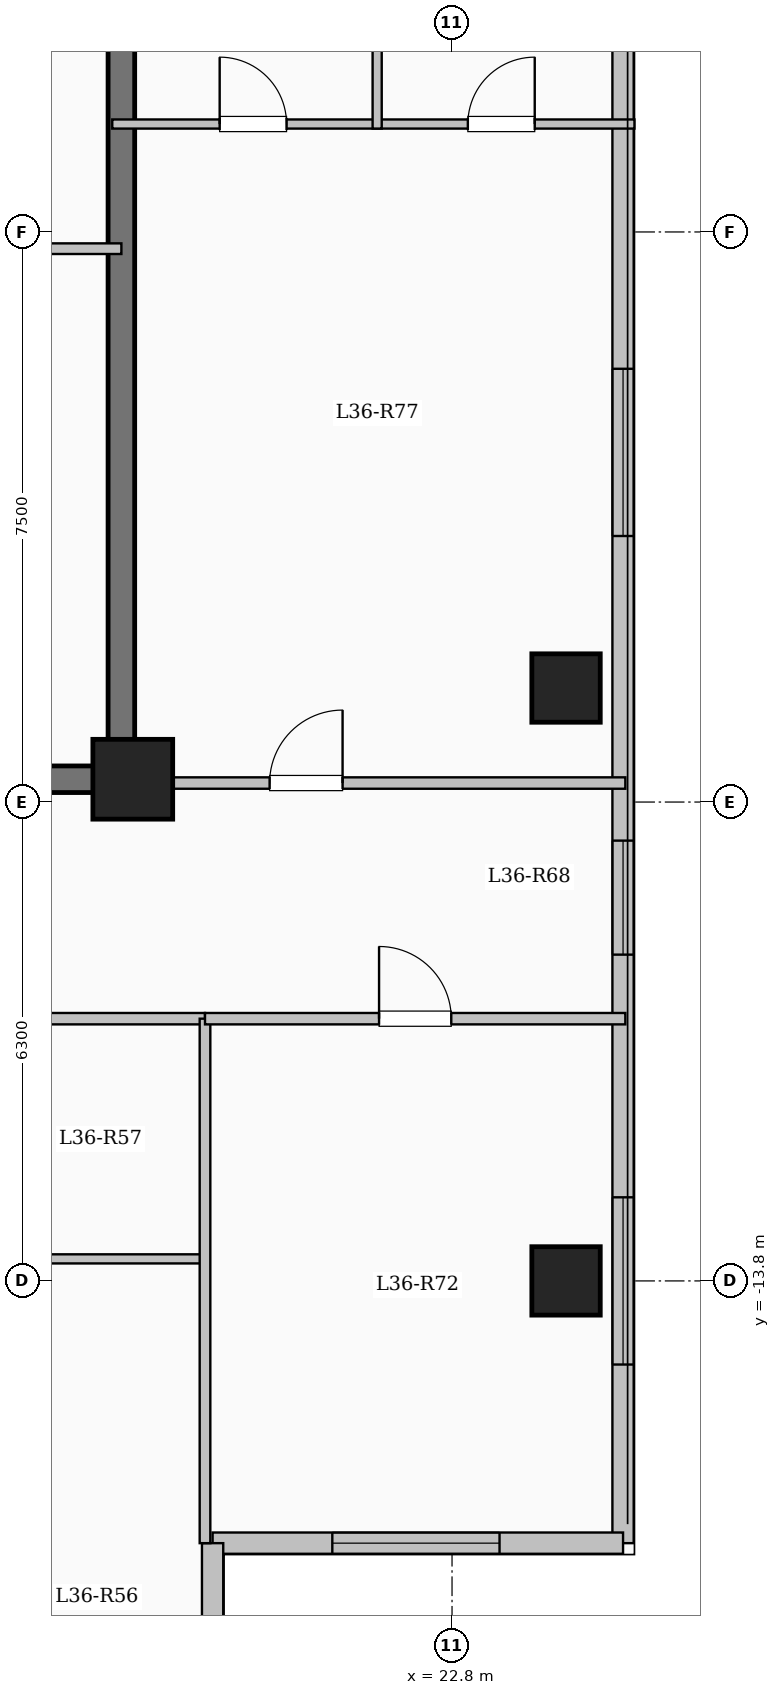
"""IFC4 building model, lengths in metres.
Left out: names, types, materials, properties, quantities, classifications, styles, units other than length and angle.
Written with IfcOpenShell. Run it as: python <this file> out.ifc"""

import sys

from ifc_helpers import new_model, si_unit, direction, frame, frame_2d, origin, origin_2d, place, context, subcontext, project, spatial, rectangle, extrude, element, fill, save


model = new_model("IFC4")
c1 = context("Model", 3, precision=1e-05, world=origin(), true_north=direction((0.0, 1.0)))
c2 = subcontext(c1, "Body", "Model", "MODEL_VIEW")
j1 = project(units=[si_unit("LENGTHUNIT", "METRE"), si_unit("PLANEANGLEUNIT", "RADIAN")], contexts=[c1])
p1 = place(None, origin())
s1 = spatial("IfcSite", under=j1, at=p1, CompositionType="ELEMENT")
p2 = place(p1, origin())
s2 = spatial("IfcBuilding", under=s1, at=p2, CompositionType="ELEMENT")
p3 = place(p2, frame((0.0, 0.0, 135.95)))
s3 = spatial("IfcBuildingStorey", under=s2, at=p3, CompositionType="ELEMENT", Elevation=135.95)
p4 = place(p3, frame((18.6, -7.2, 0.0), z_axis=(0.0, 0.0, 1.0), x_axis=(1.0, 0.0, 0.0)))
e1 = element("IfcColumn", 1, at=p4, inside=s3, PredefinedType="COLUMN", context=c2, shape_type="SweptSolid", body=[
    extrude(rectangle(XDim=1.05, YDim=1.05, at=origin_2d()), origin(), (0.0, 0.0, 1.0), 3.35),
])
for number, where, z_axis, x_axis in (
    (2, (24.3, -13.8, 0.0), (0.0, 0.0, 1.0), (1.0, 0.0, 0.0)),
    (3, (24.3, -6.0, 0.0), (0.0, 0.0, 1.0), (1.0, 0.0, 0.0)),
):
    element("IfcColumn", number, at=place(p3, frame(where, z_axis=z_axis, x_axis=x_axis)), inside=s3, PredefinedType="COLUMN", context=c2, shape_type="SweptSolid", body=[
        extrude(rectangle(XDim=0.9, YDim=0.9, at=origin_2d()), origin(), (0.0, 0.0, 1.0), 3.35),
    ])
p5 = place(p3, frame((25.05, 17.25, 0.0), z_axis=(0.0, 0.0, 1.0), x_axis=(0.0, -1.0, 0.0)))
e4 = element("IfcWall", 4, at=p5, inside=s3, PredefinedType="SOLIDWALL", context=c2, shape_type="SweptSolid", body=[
    extrude(rectangle(XDim=34.5, YDim=0.28, at=frame_2d((17.25, 0.0))), origin(), (0.0, 0.0, 1.0), 3.1),
])
p6 = place(p5, frame((1.375, 0.0, 0.9)))
e5 = element("IfcOpeningElement", 5, at=p6, cuts=e4, PredefinedType="OPENING", context=c2, shape_type="SweptSolid", body=[
    extrude(rectangle(XDim=2.0, YDim=1.7, at=frame_2d((1.0, 0.85))), frame((0.0, 0.15, 0.0), z_axis=(0.0, -1.0, 0.0), x_axis=(1.0, 0.0, 0.0)), (0.0, 0.0, 1.0), 0.3),
])
p7 = place(p5, frame((5.125, 0.0, 0.95)))
e6 = element("IfcOpeningElement", 6, at=p7, cuts=e4, PredefinedType="OPENING", context=c2, shape_type="SweptSolid", body=[
    extrude(rectangle(XDim=1.0, YDim=1.5, at=frame_2d((0.5, 0.75))), frame((0.0, 0.15, 0.0), z_axis=(0.0, -1.0, 0.0), x_axis=(1.0, 0.0, 0.0)), (0.0, 0.0, 1.0), 0.3),
])
p8 = place(p5, frame((8.375, 0.0, 0.9)))
e7 = element("IfcOpeningElement", 7, at=p8, cuts=e4, PredefinedType="OPENING", context=c2, shape_type="SweptSolid", body=[
    extrude(rectangle(XDim=2.0, YDim=1.7, at=frame_2d((1.0, 0.85))), frame((0.0, 0.15, 0.0), z_axis=(0.0, -1.0, 0.0), x_axis=(1.0, 0.0, 0.0)), (0.0, 0.0, 1.0), 0.3),
])
p9 = place(p5, frame((13.2, 0.0, 0.9)))
e8 = element("IfcOpeningElement", 8, at=p9, cuts=e4, PredefinedType="OPENING", context=c2, shape_type="SweptSolid", body=[
    extrude(rectangle(XDim=1.65, YDim=1.6, at=frame_2d((0.825, 0.8))), frame((0.0, 0.15, 0.0), z_axis=(0.0, -1.0, 0.0), x_axis=(1.0, 0.0, 0.0)), (0.0, 0.0, 1.0), 0.3),
])
p10 = place(p5, frame((19.05, 0.0, 0.9)))
e9 = element("IfcOpeningElement", 9, at=p10, cuts=e4, PredefinedType="OPENING", context=c2, shape_type="SweptSolid", body=[
    extrude(rectangle(XDim=2.2, YDim=1.75, at=frame_2d((1.1, 0.875))), frame((0.0, 0.15, 0.0), z_axis=(0.0, -1.0, 0.0), x_axis=(1.0, 0.0, 0.0)), (0.0, 0.0, 1.0), 0.3),
])
p11 = place(p5, frame((25.258, 0.0, 0.9)))
e10 = element("IfcOpeningElement", 10, at=p11, cuts=e4, PredefinedType="OPENING", context=c2, shape_type="SweptSolid", body=[
    extrude(rectangle(XDim=1.5, YDim=1.65, at=frame_2d((0.75, 0.825))), frame((0.0, 0.15, 0.0), z_axis=(0.0, -1.0, 0.0), x_axis=(1.0, 0.0, 0.0)), (0.0, 0.0, 1.0), 0.3),
])
p12 = place(p5, frame((29.95, 0.0, 0.9)))
e11 = element("IfcOpeningElement", 11, at=p12, cuts=e4, PredefinedType="OPENING", context=c2, shape_type="SweptSolid", body=[
    extrude(rectangle(XDim=2.2, YDim=1.75, at=frame_2d((1.1, 0.875))), frame((0.0, 0.15, 0.0), z_axis=(0.0, -1.0, 0.0), x_axis=(1.0, 0.0, 0.0)), (0.0, 0.0, 1.0), 0.3),
])
p13 = place(p3, frame((25.05, -17.25, 0.0), z_axis=(0.0, 0.0, 1.0), x_axis=(-1.0, 0.0, 0.0)))
e12 = element("IfcWall", 12, at=p13, inside=s3, PredefinedType="SOLIDWALL", context=c2, shape_type="SweptSolid", body=[
    extrude(rectangle(XDim=5.4, YDim=0.28, at=frame_2d((2.7, 0.0))), origin(), (0.0, 0.0, 1.0), 3.1),
])
p14 = place(p13, frame((1.625, 0.0, 0.9)))
e13 = element("IfcOpeningElement", 13, at=p14, cuts=e12, PredefinedType="OPENING", context=c2, shape_type="SweptSolid", body=[
    extrude(rectangle(XDim=2.2, YDim=1.75, at=frame_2d((1.1, 0.875))), frame((0.0, 0.15, 0.0), z_axis=(0.0, -1.0, 0.0), x_axis=(1.0, 0.0, 0.0)), (0.0, 0.0, 1.0), 0.3),
])
p15 = place(p3, frame((19.65, -17.25, 0.0), z_axis=(0.0, 0.0, 1.0), x_axis=(0.0, -1.0, 0.0)))
e14 = element("IfcWall", 14, at=p15, inside=s3, PredefinedType="SOLIDWALL", context=c2, shape_type="SweptSolid", body=[
    extrude(rectangle(XDim=3.9, YDim=0.28, at=frame_2d((1.95, 0.0))), origin(), (0.0, 0.0, 1.0), 3.1),
])
p16 = place(p15, frame((1.107, 0.0, 0.9)))
e15 = element("IfcOpeningElement", 15, at=p16, cuts=e14, PredefinedType="OPENING", context=c2, shape_type="SweptSolid", body=[
    extrude(rectangle(XDim=1.65, YDim=1.6, at=frame_2d((0.825, 0.8))), frame((0.0, 0.15, 0.0), z_axis=(0.0, -1.0, 0.0), x_axis=(1.0, 0.0, 0.0)), (0.0, 0.0, 1.0), 0.3),
])
p17 = place(p3, frame((18.45, -7.375, 0.0), z_axis=(0.0, 0.0, 1.0), x_axis=(0.0, 1.0, 0.0)))
e16 = element("IfcWall", 16, at=p17, inside=s3, PredefinedType="SHEAR", context=c2, shape_type="SweptSolid", body=[
    extrude(rectangle(XDim=14.05, YDim=0.35, at=frame_2d((7.025, 0.0))), origin(), (0.0, 0.0, 1.0), 3.35),
])
p18 = place(p3, frame((10.075, -7.2, 0.0), z_axis=(0.0, 0.0, 1.0), x_axis=(1.0, 0.0, 0.0)))
e17 = element("IfcWall", 17, at=p18, inside=s3, PredefinedType="SHEAR", context=c2, shape_type="SweptSolid", body=[
    extrude(rectangle(XDim=8.55, YDim=0.35, at=frame_2d((4.275, 0.0))), origin(), (0.0, 0.0, 1.0), 3.35),
])
p19 = place(p3, frame((15.4, -0.22, 0.0), z_axis=(0.0, 0.0, 1.0), x_axis=(1.0, 0.0, 0.0)))
e18 = element("IfcWall", 18, at=p19, inside=s3, PredefinedType="PARTITIONING", context=c2, shape_type="SweptSolid", body=[
    extrude(rectangle(XDim=3.05, YDim=0.14, at=frame_2d((1.525, 0.0))), origin(), (0.0, 0.0, 1.0), 3.1),
])
p20 = place(p19, frame((1.05, 0.0, 0.0)))
e19 = element("IfcOpeningElement", 19, at=p20, cuts=e18, PredefinedType="OPENING", context=c2, shape_type="SweptSolid", body=[
    extrude(rectangle(XDim=0.9, YDim=2.08, at=frame_2d((0.45, 1.04))), frame((0.0, 0.08, 0.0), z_axis=(0.0, -1.0, 0.0), x_axis=(1.0, 0.0, 0.0)), (0.0, 0.0, 1.0), 0.16),
])
p21 = place(p3, frame((8.55, -10.35, 0.0), z_axis=(0.0, 0.0, 1.0), x_axis=(1.0, 0.0, 0.0)))
e20 = element("IfcWall", 20, at=p21, inside=s3, PredefinedType="PARTITIONING", context=c2, shape_type="SweptSolid", body=[
    extrude(rectangle(XDim=11.0, YDim=0.15, at=frame_2d((5.5, 0.0))), origin(), (0.0, 0.0, 1.0), 3.1),
])
p22 = place(p21, frame((0.75, 0.0, 0.0)))
e21 = element("IfcOpeningElement", 21, at=p22, cuts=e20, PredefinedType="OPENING", context=c2, shape_type="SweptSolid", body=[
    extrude(rectangle(XDim=0.96, YDim=2.15, at=frame_2d((0.48, 1.075))), frame((0.0, 0.085, 0.0), z_axis=(0.0, -1.0, 0.0), x_axis=(1.0, 0.0, 0.0)), (0.0, 0.0, 1.0), 0.17),
])
p23 = place(p21, frame((5.787, 0.0, 0.0)))
e22 = element("IfcOpeningElement", 22, at=p23, cuts=e20, PredefinedType="OPENING", context=c2, shape_type="SweptSolid", body=[
    extrude(rectangle(XDim=0.96, YDim=2.15, at=frame_2d((0.48, 1.075))), frame((0.0, 0.085, 0.0), z_axis=(0.0, -1.0, 0.0), x_axis=(1.0, 0.0, 0.0)), (0.0, 0.0, 1.0), 0.17),
])
p24 = place(p3, frame((16.649, -13.51, 0.0), z_axis=(0.0, 0.0, 1.0), x_axis=(1.0, 0.0, 0.0)))
e23 = element("IfcWall", 23, at=p24, inside=s3, PredefinedType="PARTITIONING", context=c2, shape_type="SweptSolid", body=[
    extrude(rectangle(XDim=2.961, YDim=0.12, at=frame_2d((1.48, 0.0))), origin(), (0.0, 0.0, 1.0), 3.1),
])
p25 = place(p3, frame((18.45, -7.25, 0.0), z_axis=(0.0, 0.0, 1.0), x_axis=(1.0, 0.0, 0.0)))
e24 = element("IfcWall", 24, at=p25, inside=s3, PredefinedType="PARTITIONING", context=c2, shape_type="SweptSolid", body=[
    extrude(rectangle(XDim=6.63, YDim=0.15, at=frame_2d((3.315, 0.0))), origin(), (0.0, 0.0, 1.0), 3.1),
])
p26 = place(p25, frame((1.95, 0.0, 0.0)))
e25 = element("IfcOpeningElement", 25, at=p26, cuts=e24, PredefinedType="OPENING", context=c2, shape_type="SweptSolid", body=[
    extrude(rectangle(XDim=0.96, YDim=2.15, at=frame_2d((0.48, 1.075))), frame((0.0, 0.085, 0.0), z_axis=(0.0, -1.0, 0.0), x_axis=(1.0, 0.0, 0.0)), (0.0, 0.0, 1.0), 0.17),
])
p27 = place(p3, frame((19.55, -17.25, 0.0), z_axis=(0.0, 0.0, 1.0), x_axis=(0.0, 1.0, 0.0)))
e26 = element("IfcWall", 26, at=p27, inside=s3, PredefinedType="PARTITIONING", context=c2, shape_type="SweptSolid", body=[
    extrude(rectangle(XDim=6.9, YDim=0.14, at=frame_2d((3.45, 0.0))), origin(), (0.0, 0.0, 1.0), 3.1),
])
p28 = place(p3, frame((19.55, -10.35, 0.0), z_axis=(0.0, 0.0, 1.0), x_axis=(1.0, 0.0, 0.0)))
e27 = element("IfcWall", 27, at=p28, inside=s3, PredefinedType="PARTITIONING", context=c2, shape_type="SweptSolid", body=[
    extrude(rectangle(XDim=5.53, YDim=0.15, at=frame_2d((2.765, 0.0))), origin(), (0.0, 0.0, 1.0), 3.1),
])
p29 = place(p28, frame((2.29, 0.0, 0.0)))
e28 = element("IfcOpeningElement", 28, at=p29, cuts=e27, PredefinedType="OPENING", context=c2, shape_type="SweptSolid", body=[
    extrude(rectangle(XDim=0.95, YDim=2.15, at=frame_2d((0.475, 1.075))), frame((0.0, 0.085, 0.0), z_axis=(0.0, -1.0, 0.0), x_axis=(1.0, 0.0, 0.0)), (0.0, 0.0, 1.0), 0.17),
])
p30 = place(p3, frame((18.33, 1.42, 0.0), z_axis=(0.0, 0.0, 1.0), x_axis=(1.0, 0.0, 0.0)))
e29 = element("IfcWall", 29, at=p30, inside=s3, PredefinedType="PARTITIONING", context=c2, shape_type="SweptSolid", body=[
    extrude(rectangle(XDim=6.87, YDim=0.12, at=frame_2d((3.435, 0.0))), origin(), (0.0, 0.0, 1.0), 3.1),
])
p31 = place(p30, frame((1.413, 0.0, 0.0)))
e30 = element("IfcOpeningElement", 30, at=p31, cuts=e29, PredefinedType="OPENING", context=c2, shape_type="SweptSolid", body=[
    extrude(rectangle(XDim=0.88, YDim=2.1, at=frame_2d((0.44, 1.05))), frame((0.0, 0.07, 0.0), z_axis=(0.0, -1.0, 0.0), x_axis=(1.0, 0.0, 0.0)), (0.0, 0.0, 1.0), 0.14),
])
p32 = place(p30, frame((4.678, 0.0, 0.0)))
e31 = element("IfcOpeningElement", 31, at=p32, cuts=e29, PredefinedType="OPENING", context=c2, shape_type="SweptSolid", body=[
    extrude(rectangle(XDim=0.88, YDim=2.1, at=frame_2d((0.44, 1.05))), frame((0.0, 0.07, 0.0), z_axis=(0.0, -1.0, 0.0), x_axis=(1.0, 0.0, 0.0)), (0.0, 0.0, 1.0), 0.14),
])
p33 = place(p3, frame((21.815, 1.36, 0.0), z_axis=(0.0, 0.0, 1.0), x_axis=(0.0, 1.0, 0.0)))
e32 = element("IfcWall", 32, at=p33, inside=s3, PredefinedType="PARTITIONING", context=c2, shape_type="SweptSolid", body=[
    extrude(rectangle(XDim=3.58, YDim=0.12, at=frame_2d((1.79, 0.0))), origin(), (0.0, 0.0, 1.0), 3.1),
])
p34 = place(p10, origin())
e33 = element("IfcWindow", 33, at=p34, inside=s3, PartitioningType="SINGLE_PANEL", PredefinedType="WINDOW", context=c2, shape_type="SweptSolid", body=[
    extrude(rectangle(XDim=2.2, YDim=1.75, at=frame_2d((1.1, 0.875))), frame((0.0, 0.03, 0.0), z_axis=(0.0, -1.0, 0.0), x_axis=(1.0, 0.0, 0.0)), (0.0, 0.0, 1.0), 0.06),
])
fill(e9, e33)
p35 = place(p11, origin())
e34 = element("IfcWindow", 34, at=p35, inside=s3, PartitioningType="SINGLE_PANEL", PredefinedType="WINDOW", context=c2, shape_type="SweptSolid", body=[
    extrude(rectangle(XDim=1.5, YDim=1.65, at=frame_2d((0.75, 0.825))), frame((0.0, 0.03, 0.0), z_axis=(0.0, -1.0, 0.0), x_axis=(1.0, 0.0, 0.0)), (0.0, 0.0, 1.0), 0.06),
])
fill(e10, e34)
p36 = place(p12, origin())
e35 = element("IfcWindow", 35, at=p36, inside=s3, PartitioningType="SINGLE_PANEL", PredefinedType="WINDOW", context=c2, shape_type="SweptSolid", body=[
    extrude(rectangle(XDim=2.2, YDim=1.75, at=frame_2d((1.1, 0.875))), frame((0.0, 0.03, 0.0), z_axis=(0.0, -1.0, 0.0), x_axis=(1.0, 0.0, 0.0)), (0.0, 0.0, 1.0), 0.06),
])
fill(e11, e35)
p37 = place(p14, origin())
e36 = element("IfcWindow", 36, at=p37, inside=s3, PartitioningType="SINGLE_PANEL", PredefinedType="WINDOW", context=c2, shape_type="SweptSolid", body=[
    extrude(rectangle(XDim=2.2, YDim=1.75, at=frame_2d((1.1, 0.875))), frame((0.0, 0.03, 0.0), z_axis=(0.0, -1.0, 0.0), x_axis=(1.0, 0.0, 0.0)), (0.0, 0.0, 1.0), 0.06),
])
fill(e13, e36)
p38 = place(p29, origin())
e37 = element("IfcDoor", 37, at=p38, inside=s3, OperationType="SINGLE_SWING_LEFT", PredefinedType="DOOR", context=c2, shape_type="SweptSolid", body=[
    extrude(rectangle(XDim=0.95, YDim=2.15, at=frame_2d((0.475, 1.075))), frame((0.0, 0.025, 0.0), z_axis=(0.0, -1.0, 0.0), x_axis=(1.0, 0.0, 0.0)), (0.0, 0.0, 1.0), 0.05),
])
fill(e28, e37)
p39 = place(p26, origin())
e38 = element("IfcDoor", 38, at=p39, inside=s3, OperationType="SINGLE_SWING_RIGHT", PredefinedType="DOOR", context=c2, shape_type="SweptSolid", body=[
    extrude(rectangle(XDim=0.96, YDim=2.15, at=frame_2d((0.48, 1.075))), frame((0.0, 0.025, 0.0), z_axis=(0.0, -1.0, 0.0), x_axis=(1.0, 0.0, 0.0)), (0.0, 0.0, 1.0), 0.05),
])
fill(e25, e38)
p40 = place(p31, origin())
e39 = element("IfcDoor", 39, at=p40, inside=s3, OperationType="SINGLE_SWING_LEFT", PredefinedType="DOOR", context=c2, shape_type="SweptSolid", body=[
    extrude(rectangle(XDim=0.88, YDim=2.1, at=frame_2d((0.44, 1.05))), frame((0.0, 0.025, 0.0), z_axis=(0.0, -1.0, 0.0), x_axis=(1.0, 0.0, 0.0)), (0.0, 0.0, 1.0), 0.05),
])
fill(e30, e39)
p41 = place(p32, origin())
e40 = element("IfcDoor", 40, at=p41, inside=s3, OperationType="SINGLE_SWING_RIGHT", PredefinedType="DOOR", context=c2, shape_type="SweptSolid", body=[
    extrude(rectangle(XDim=0.88, YDim=2.1, at=frame_2d((0.44, 1.05))), frame((0.0, 0.025, 0.0), z_axis=(0.0, -1.0, 0.0), x_axis=(1.0, 0.0, 0.0)), (0.0, 0.0, 1.0), 0.05),
])
fill(e31, e40)
save(model, sys.argv[1])
